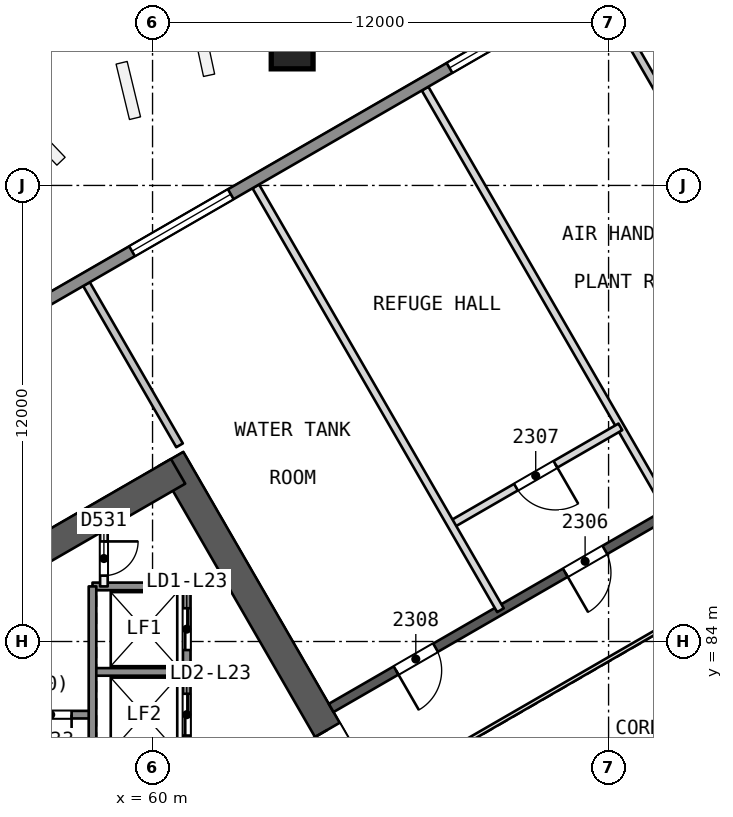
"""IFC4 building model, lengths in metres.
Left out: names, types, materials, properties, quantities, classifications, styles, units other than length and angle.
Written with IfcOpenShell. Run it as: python <this file> out.ifc"""

import sys

from ifc_helpers import new_model, si_unit, direction, frame, frame_2d, origin, origin_2d, place, context, subcontext, project, spatial, rectangle, extrude, element, fill, save


model = new_model("IFC4")
c1 = context("Model", 3, precision=1e-05, world=origin(), true_north=direction((0.0, 1.0)))
c2 = subcontext(c1, "Body", "Model", "MODEL_VIEW")
j1 = project(units=[si_unit("LENGTHUNIT", "METRE"), si_unit("PLANEANGLEUNIT", "RADIAN")], contexts=[c1])
p1 = place(None, origin())
s1 = spatial("IfcSite", under=j1, at=p1, CompositionType="ELEMENT")
p2 = place(p1, origin())
s2 = spatial("IfcBuilding", under=s1, at=p2, CompositionType="ELEMENT")
p3 = place(p2, frame((0.0, 0.0, 98.0)))
s3 = spatial("IfcBuildingStorey", under=s2, at=p3, CompositionType="ELEMENT", Elevation=98.0)
p4 = place(p3, frame((65.567, 80.0, 0.0), z_axis=(0.0, 0.0, 1.0), x_axis=(-0.499988615364, 0.866031976607, 0.0)))
e1 = element("IfcWall", 1, at=p4, inside=s3, PredefinedType="SHEAR", context=c2, shape_type="SweptSolid", body=[
    extrude(rectangle(XDim=10.163, YDim=0.75, at=frame_2d((5.082, 0.0))), origin(), (0.0, 0.0, 1.0), 4.4),
])
p5 = place(p4, frame((0.733, 0.0, 0.0)))
e2 = element("IfcOpeningElement", 2, at=p5, cuts=e1, PredefinedType="OPENING", context=c2, shape_type="SweptSolid", body=[
    extrude(rectangle(XDim=1.2, YDim=2.1, at=frame_2d((0.6, 1.05))), frame((0.0, 0.385, 0.0), z_axis=(0.0, -1.0, 0.0), x_axis=(1.0, 0.0, 0.0)), (0.0, 0.0, 1.0), 0.771),
])
p6 = place(p3, frame((60.673, 88.477, 0.0), z_axis=(0.0, 0.0, 1.0), x_axis=(-0.8660248072, -0.500001033313, 0.0)))
e3 = element("IfcWall", 3, at=p6, inside=s3, PredefinedType="SHEAR", context=c2, shape_type="SweptSolid", body=[
    extrude(rectangle(XDim=13.958, YDim=0.75, at=frame_2d((6.979, 0.0))), origin(), (0.0, 0.0, 1.0), 4.4),
])
p7 = place(p3, frame((78.2, 90.046, 0.0), z_axis=(0.0, 0.0, 1.0), x_axis=(-0.866026492143, -0.499998114903, 0.0)))
e4 = element("IfcWall", 4, at=p7, inside=s3, PredefinedType="SHEAR", context=c2, shape_type="SweptSolid", body=[
    extrude(rectangle(XDim=15.588, YDim=0.25, at=frame_2d((7.794, 0.0))), origin(), (0.0, 0.0, 1.0), 3.9),
])
p8 = place(p7, frame((2.05, 0.0, 0.0)))
e5 = element("IfcOpeningElement", 5, at=p8, cuts=e4, PredefinedType="OPENING", context=c2, shape_type="SweptSolid", body=[
    extrude(rectangle(XDim=1.2, YDim=2.4, at=frame_2d((0.6, 1.2))), frame((0.0, 0.135, 0.0), z_axis=(0.0, -1.0, 0.0), x_axis=(1.0, 0.0, 0.0)), (0.0, 0.0, 1.0), 0.271),
])
p9 = place(p7, frame((7.272, 0.0, 0.0)))
e6 = element("IfcOpeningElement", 6, at=p9, cuts=e4, PredefinedType="OPENING", context=c2, shape_type="SweptSolid", body=[
    extrude(rectangle(XDim=1.2, YDim=2.4, at=frame_2d((0.6, 1.2))), frame((0.0, 0.135, 0.0), z_axis=(0.0, -1.0, 0.0), x_axis=(1.0, 0.0, 0.0)), (0.0, 0.0, 1.0), 0.271),
])
p10 = place(p7, frame((12.417, 0.0, 0.0)))
e7 = element("IfcOpeningElement", 7, at=p10, cuts=e4, PredefinedType="OPENING", context=c2, shape_type="SweptSolid", body=[
    extrude(rectangle(XDim=1.2, YDim=2.4, at=frame_2d((0.6, 1.2))), frame((0.0, 0.135, 0.0), z_axis=(0.0, -1.0, 0.0), x_axis=(1.0, 0.0, 0.0)), (0.0, 0.0, 1.0), 0.271),
])
p11 = place(p3, frame((63.661, 99.639, 0.0), z_axis=(0.010096711238, -0.017475077143, 0.999796318307), x_axis=(0.865862358291, 0.500282296803, 1.09549e-07)))
e8 = element("IfcColumn", 8, at=p11, inside=s3, PredefinedType="COLUMN", context=c2, shape_type="SweptSolid", body=[
    extrude(rectangle(XDim=1.1, YDim=1.1, at=origin_2d()), origin(), (0.0, 0.0, 1.0), 4.401),
])
p12 = place(p3, frame((67.171, 98.549, 0.0), z_axis=(0.0, 0.0, 1.0), x_axis=(0.500006895855, -0.866021422424, 0.0)))
e9 = element("IfcWall", 9, at=p12, inside=s3, PredefinedType="PARTITIONING", context=c2, shape_type="SweptSolid", body=[
    extrude(rectangle(XDim=12.878, YDim=0.2, at=frame_2d((6.439, 0.0))), origin(), (0.0, 0.0, 1.0), 3.9),
])
p13 = place(p3, frame((71.761, 101.199, 0.0), z_axis=(0.0, 0.0, 1.0), x_axis=(0.499971209087, -0.866042025588, 0.0)))
e10 = element("IfcWall", 10, at=p13, inside=s3, PredefinedType="PARTITIONING", context=c2, shape_type="SweptSolid", body=[
    extrude(rectangle(XDim=4.899, YDim=0.2, at=frame_2d((2.45, 0.0))), origin(), (0.0, 0.0, 1.0), 3.9),
])
p14 = place(p3, frame((72.31, 89.647, 0.0), z_axis=(0.0, 0.0, 1.0), x_axis=(-0.866035426308, -0.499982640079, 0.0)))
e11 = element("IfcWall", 11, at=p14, inside=s3, PredefinedType="PARTITIONING", context=c2, shape_type="SweptSolid", body=[
    extrude(rectangle(XDim=5.144, YDim=0.2, at=frame_2d((2.572, 0.0))), origin(), (0.0, 0.0, 1.0), 3.9),
])
p15 = place(p14, frame((1.972, 0.0, 0.0)))
e12 = element("IfcOpeningElement", 12, at=p15, cuts=e11, PredefinedType="OPENING", context=c2, shape_type="SweptSolid", body=[
    extrude(rectangle(XDim=1.2, YDim=2.4, at=frame_2d((0.6, 1.2))), frame((0.0, 0.11, 0.0), z_axis=(0.0, -1.0, 0.0), x_axis=(1.0, 0.0, 0.0)), (0.0, 0.0, 1.0), 0.221),
])
p16 = place(p3, frame((62.716, 95.977, 0.0), z_axis=(0.0, 0.0, 1.0), x_axis=(0.500006895855, -0.866021422424, 0.0)))
e13 = element("IfcWall", 13, at=p16, inside=s3, PredefinedType="PARTITIONING", context=c2, shape_type="SweptSolid", body=[
    extrude(rectangle(XDim=12.878, YDim=0.2, at=frame_2d((6.439, 0.0))), origin(), (0.0, 0.0, 1.0), 3.9),
])
p17 = place(p3, frame((60.71, 89.162, 0.0), z_axis=(0.0, 0.0, 1.0), x_axis=(-0.499971209087, 0.866042025588, 0.0)))
e14 = element("IfcWall", 14, at=p17, inside=s3, PredefinedType="PARTITIONING", context=c2, shape_type="SweptSolid", body=[
    extrude(rectangle(XDim=4.899, YDim=0.2, at=frame_2d((2.45, 0.0))), origin(), (0.0, 0.0, 1.0), 3.9),
])
p18 = place(p3, frame((39.875, 82.961, 0.0), z_axis=(0.0, 0.0, 1.0), x_axis=(0.866025498246, 0.499999836387, 0.0)))
e15 = element("IfcWall", 15, at=p18, inside=s3, PredefinedType="SOLIDWALL", context=c2, shape_type="SweptSolid", body=[
    extrude(rectangle(XDim=57.878, YDim=0.3, at=frame_2d((28.939, 0.0))), origin(), (0.0, 0.0, 1.0), 3.9),
])
p19 = place(p18, frame((3.323, 0.0, 0.6)))
e16 = element("IfcOpeningElement", 16, at=p19, cuts=e15, PredefinedType="OPENING", context=c2, shape_type="SweptSolid", body=[
    extrude(rectangle(XDim=3.0, YDim=2.4, at=frame_2d((1.5, 1.2))), frame((0.0, 0.161, 0.0), z_axis=(0.0, -1.0, 0.0), x_axis=(1.0, 0.0, 0.0)), (0.0, 0.0, 1.0), 0.321),
])
p20 = place(p18, frame((12.969, 0.0, 0.6)))
e17 = element("IfcOpeningElement", 17, at=p20, cuts=e15, PredefinedType="OPENING", context=c2, shape_type="SweptSolid", body=[
    extrude(rectangle(XDim=3.0, YDim=2.4, at=frame_2d((1.5, 1.2))), frame((0.0, 0.161, 0.0), z_axis=(0.0, -1.0, 0.0), x_axis=(1.0, 0.0, 0.0)), (0.0, 0.0, 1.0), 0.321),
])
p21 = place(p18, frame((22.616, 0.0, 0.6)))
e18 = element("IfcOpeningElement", 18, at=p21, cuts=e15, PredefinedType="OPENING", context=c2, shape_type="SweptSolid", body=[
    extrude(rectangle(XDim=3.0, YDim=2.4, at=frame_2d((1.5, 1.2))), frame((0.0, 0.161, 0.0), z_axis=(0.0, -1.0, 0.0), x_axis=(1.0, 0.0, 0.0)), (0.0, 0.0, 1.0), 0.321),
])
p22 = place(p18, frame((32.262, 0.0, 0.6)))
e19 = element("IfcOpeningElement", 19, at=p22, cuts=e15, PredefinedType="OPENING", context=c2, shape_type="SweptSolid", body=[
    extrude(rectangle(XDim=3.0, YDim=2.4, at=frame_2d((1.5, 1.2))), frame((0.0, 0.161, 0.0), z_axis=(0.0, -1.0, 0.0), x_axis=(1.0, 0.0, 0.0)), (0.0, 0.0, 1.0), 0.321),
])
p23 = place(p18, frame((41.908, 0.0, 0.6)))
e20 = element("IfcOpeningElement", 20, at=p23, cuts=e15, PredefinedType="OPENING", context=c2, shape_type="SweptSolid", body=[
    extrude(rectangle(XDim=3.0, YDim=2.4, at=frame_2d((1.5, 1.2))), frame((0.0, 0.161, 0.0), z_axis=(0.0, -1.0, 0.0), x_axis=(1.0, 0.0, 0.0)), (0.0, 0.0, 1.0), 0.321),
])
p24 = place(p18, frame((51.555, 0.0, 0.6)))
e21 = element("IfcOpeningElement", 21, at=p24, cuts=e15, PredefinedType="OPENING", context=c2, shape_type="SweptSolid", body=[
    extrude(rectangle(XDim=3.0, YDim=2.4, at=frame_2d((1.5, 1.2))), frame((0.0, 0.161, 0.0), z_axis=(0.0, -1.0, 0.0), x_axis=(1.0, 0.0, 0.0)), (0.0, 0.0, 1.0), 0.321),
])
for number, where, z_axis, x_axis in (
    (22, (60.9, 85.45, 0.0), (0.0, 0.0, 1.0), (-1.0, 0.0, 0.0)),
    (23, (60.9, 83.2, 0.0), (0.0, 0.0, 1.0), (-1.0, 0.0, 0.0)),
):
    element("IfcWall", number, at=place(p3, frame(where, z_axis=z_axis, x_axis=x_axis)), inside=s3, PredefinedType="SOLIDWALL", context=c2, shape_type="SweptSolid", body=[
        extrude(rectangle(XDim=2.48, YDim=0.2, at=frame_2d((1.24, 0.0))), origin(), (0.0, 0.0, 1.0), 3.9),
    ])
p25 = place(p3, frame((58.42, 82.075, 0.0), z_axis=(0.0, 0.0, 1.0), x_axis=(-1.0, 0.0, 0.0)))
e24 = element("IfcWall", 24, at=p25, inside=s3, PredefinedType="SOLIDWALL", context=c2, shape_type="SweptSolid", body=[
    extrude(rectangle(XDim=7.7, YDim=0.2, at=frame_2d((3.85, 0.0))), origin(), (0.0, 0.0, 1.0), 3.9),
])
p26 = place(p25, frame((0.55, 0.0, 0.0)))
e25 = element("IfcOpeningElement", 25, at=p26, cuts=e24, PredefinedType="OPENING", context=c2, shape_type="SweptSolid", body=[
    extrude(rectangle(XDim=1.1, YDim=2.1, at=frame_2d((0.55, 1.05))), frame((0.0, 0.11, 0.0), z_axis=(0.0, -1.0, 0.0), x_axis=(1.0, 0.0, 0.0)), (0.0, 0.0, 1.0), 0.221),
])
p27 = place(p3, frame((60.9, 85.45, 0.0), z_axis=(0.0, 0.0, 1.0), x_axis=(0.0, -1.0, 0.0)))
e26 = element("IfcWall", 26, at=p27, inside=s3, PredefinedType="SOLIDWALL", context=c2, shape_type="SweptSolid", body=[
    extrude(rectangle(XDim=10.9, YDim=0.2, at=frame_2d((5.45, 0.0))), origin(), (0.0, 0.0, 1.0), 3.9),
])
p28 = place(p27, frame((0.575, 0.0, 0.0)))
e27 = element("IfcOpeningElement", 27, at=p28, cuts=e26, PredefinedType="OPENING", context=c2, shape_type="SweptSolid", body=[
    extrude(rectangle(XDim=1.1, YDim=2.1, at=frame_2d((0.55, 1.05))), frame((0.0, 0.11, 0.0), z_axis=(0.0, -1.0, 0.0), x_axis=(1.0, 0.0, 0.0)), (0.0, 0.0, 1.0), 0.221),
])
p29 = place(p27, frame((2.825, 0.0, 0.0)))
e28 = element("IfcOpeningElement", 28, at=p29, cuts=e26, PredefinedType="OPENING", context=c2, shape_type="SweptSolid", body=[
    extrude(rectangle(XDim=1.1, YDim=2.1, at=frame_2d((0.55, 1.05))), frame((0.0, 0.11, 0.0), z_axis=(0.0, -1.0, 0.0), x_axis=(1.0, 0.0, 0.0)), (0.0, 0.0, 1.0), 0.221),
])
p30 = place(p27, frame((5.075, 0.0, 0.0)))
e29 = element("IfcOpeningElement", 29, at=p30, cuts=e26, PredefinedType="OPENING", context=c2, shape_type="SweptSolid", body=[
    extrude(rectangle(XDim=1.1, YDim=2.1, at=frame_2d((0.55, 1.05))), frame((0.0, 0.11, 0.0), z_axis=(0.0, -1.0, 0.0), x_axis=(1.0, 0.0, 0.0)), (0.0, 0.0, 1.0), 0.221),
])
p31 = place(p27, frame((7.325, 0.0, 0.0)))
e30 = element("IfcOpeningElement", 30, at=p31, cuts=e26, PredefinedType="OPENING", context=c2, shape_type="SweptSolid", body=[
    extrude(rectangle(XDim=1.1, YDim=2.1, at=frame_2d((0.55, 1.05))), frame((0.0, 0.11, 0.0), z_axis=(0.0, -1.0, 0.0), x_axis=(1.0, 0.0, 0.0)), (0.0, 0.0, 1.0), 0.221),
])
p32 = place(p3, frame((58.72, 86.917, 0.0), z_axis=(0.0, 0.0, 1.0), x_axis=(0.0, -1.0, 0.0)))
e31 = element("IfcWall", 31, at=p32, inside=s3, PredefinedType="PARTITIONING", context=c2, shape_type="SweptSolid", body=[
    extrude(rectangle(XDim=1.467, YDim=0.2, at=frame_2d((0.733, 0.0))), origin(), (0.0, 0.0, 1.0), 3.9),
])
p33 = place(p32, frame((0.283, 0.0, 0.0)))
e32 = element("IfcOpeningElement", 32, at=p33, cuts=e31, PredefinedType="OPENING", context=c2, shape_type="SweptSolid", body=[
    extrude(rectangle(XDim=0.9, YDim=2.1, at=frame_2d((0.45, 1.05))), frame((0.0, 0.11, 0.0), z_axis=(0.0, -1.0, 0.0), x_axis=(1.0, 0.0, 0.0)), (0.0, 0.0, 1.0), 0.221),
])
p34 = place(p3, frame((58.42, 85.45, 0.0), z_axis=(0.0, 0.0, 1.0), x_axis=(0.0, -1.0, 0.0)))
e33 = element("IfcWall", 33, at=p34, inside=s3, PredefinedType="SOLIDWALL", context=c2, shape_type="SweptSolid", body=[
    extrude(rectangle(XDim=9.0, YDim=0.2, at=frame_2d((4.5, 0.0))), origin(), (0.0, 0.0, 1.0), 3.9),
])
p35 = place(p3, frame((77.738, 86.846, 0.0), z_axis=(0.0, 0.0, 1.0), x_axis=(-0.866026658274, -0.499997827154, 0.0)))
e34 = element("IfcWall", 34, at=p35, inside=s3, PredefinedType="PARTITIONING", context=c2, shape_type="SweptSolid", body=[
    extrude(rectangle(XDim=11.588, YDim=0.1, at=frame_2d((5.794, 0.0))), origin(), (0.0, 0.0, 1.0), 3.9),
])
p36 = place(p9, origin())
e35 = element("IfcDoor", 35, at=p36, inside=s3, OperationType="SINGLE_SWING_RIGHT", PredefinedType="NOTDEFINED", context=c2, shape_type="SweptSolid", body=[
    extrude(rectangle(XDim=1.2, YDim=2.4, at=frame_2d((0.6, 1.2))), frame((0.0, 0.025, 0.0), z_axis=(0.0, -1.0, 0.0), x_axis=(1.0, 0.0, 0.0)), (0.0, 0.0, 1.0), 0.05),
])
fill(e6, e35)
p37 = place(p15, origin())
e36 = element("IfcDoor", 36, at=p37, inside=s3, OperationType="SINGLE_SWING_LEFT", PredefinedType="NOTDEFINED", context=c2, shape_type="SweptSolid", body=[
    extrude(rectangle(XDim=1.2, YDim=2.4, at=frame_2d((0.6, 1.2))), frame((0.0, 0.025, 0.0), z_axis=(0.0, -1.0, 0.0), x_axis=(1.0, 0.0, 0.0)), (0.0, 0.0, 1.0), 0.05),
])
fill(e12, e36)
p38 = place(p10, origin())
e37 = element("IfcDoor", 37, at=p38, inside=s3, OperationType="SINGLE_SWING_RIGHT", PredefinedType="NOTDEFINED", context=c2, shape_type="SweptSolid", body=[
    extrude(rectangle(XDim=1.2, YDim=2.4, at=frame_2d((0.6, 1.2))), frame((0.0, 0.025, 0.0), z_axis=(0.0, -1.0, 0.0), x_axis=(1.0, 0.0, 0.0)), (0.0, 0.0, 1.0), 0.05),
])
fill(e7, e37)
p39 = place(p21, origin())
e38 = element("IfcWindow", 38, at=p39, inside=s3, PartitioningType="SINGLE_PANEL", PredefinedType="WINDOW", context=c2, shape_type="SweptSolid", body=[
    extrude(rectangle(XDim=3.0, YDim=2.4, at=frame_2d((1.5, 1.2))), frame((0.0, 0.03, 0.0), z_axis=(0.0, -1.0, 0.0), x_axis=(1.0, 0.0, 0.0)), (0.0, 0.0, 1.0), 0.06),
])
fill(e18, e38)
p40 = place(p22, origin())
e39 = element("IfcWindow", 39, at=p40, inside=s3, PartitioningType="SINGLE_PANEL", PredefinedType="WINDOW", context=c2, shape_type="SweptSolid", body=[
    extrude(rectangle(XDim=3.0, YDim=2.4, at=frame_2d((1.5, 1.2))), frame((0.0, 0.03, 0.0), z_axis=(0.0, -1.0, 0.0), x_axis=(1.0, 0.0, 0.0)), (0.0, 0.0, 1.0), 0.06),
])
fill(e19, e39)
p41 = place(p5, origin())
e40 = element("IfcDoor", 40, at=p41, inside=s3, OperationType="SINGLE_SWING_RIGHT", PredefinedType="NOTDEFINED", context=c2, shape_type="SweptSolid", body=[
    extrude(rectangle(XDim=1.2, YDim=2.1, at=frame_2d((0.6, 1.05))), frame((0.0, 0.025, 0.0), z_axis=(0.0, -1.0, 0.0), x_axis=(1.0, 0.0, 0.0)), (0.0, 0.0, 1.0), 0.05),
])
fill(e2, e40)
p42 = place(p28, origin())
e41 = element("IfcDoor", 41, at=p42, inside=s3, OperationType="SLIDING_TO_RIGHT", PredefinedType="NOTDEFINED", context=c2, shape_type="SweptSolid", body=[
    extrude(rectangle(XDim=1.1, YDim=2.1, at=frame_2d((0.55, 1.05))), frame((0.0, 0.025, 0.0), z_axis=(0.0, -1.0, 0.0), x_axis=(1.0, 0.0, 0.0)), (0.0, 0.0, 1.0), 0.05),
])
fill(e27, e41)
p43 = place(p29, origin())
e42 = element("IfcDoor", 42, at=p43, inside=s3, OperationType="SLIDING_TO_LEFT", PredefinedType="NOTDEFINED", context=c2, shape_type="SweptSolid", body=[
    extrude(rectangle(XDim=1.1, YDim=2.1, at=frame_2d((0.55, 1.05))), frame((0.0, 0.025, 0.0), z_axis=(0.0, -1.0, 0.0), x_axis=(1.0, 0.0, 0.0)), (0.0, 0.0, 1.0), 0.05),
])
fill(e28, e42)
p44 = place(p33, origin())
e43 = element("IfcDoor", 43, at=p44, inside=s3, OperationType="SINGLE_SWING_LEFT", PredefinedType="NOTDEFINED", context=c2, shape_type="SweptSolid", body=[
    extrude(rectangle(XDim=0.9, YDim=2.1, at=frame_2d((0.45, 1.05))), frame((0.0, 0.025, 0.0), z_axis=(0.0, -1.0, 0.0), x_axis=(1.0, 0.0, 0.0)), (0.0, 0.0, 1.0), 0.05),
])
fill(e32, e43)
p45 = place(p26, origin())
e44 = element("IfcDoor", 44, at=p45, inside=s3, OperationType="SINGLE_SWING_LEFT", PredefinedType="NOTDEFINED", context=c2, shape_type="SweptSolid", body=[
    extrude(rectangle(XDim=1.1, YDim=2.1, at=frame_2d((0.55, 1.05))), frame((0.0, 0.025, 0.0), z_axis=(0.0, -1.0, 0.0), x_axis=(1.0, 0.0, 0.0)), (0.0, 0.0, 1.0), 0.05),
])
fill(e25, e44)
save(model, sys.argv[1])
